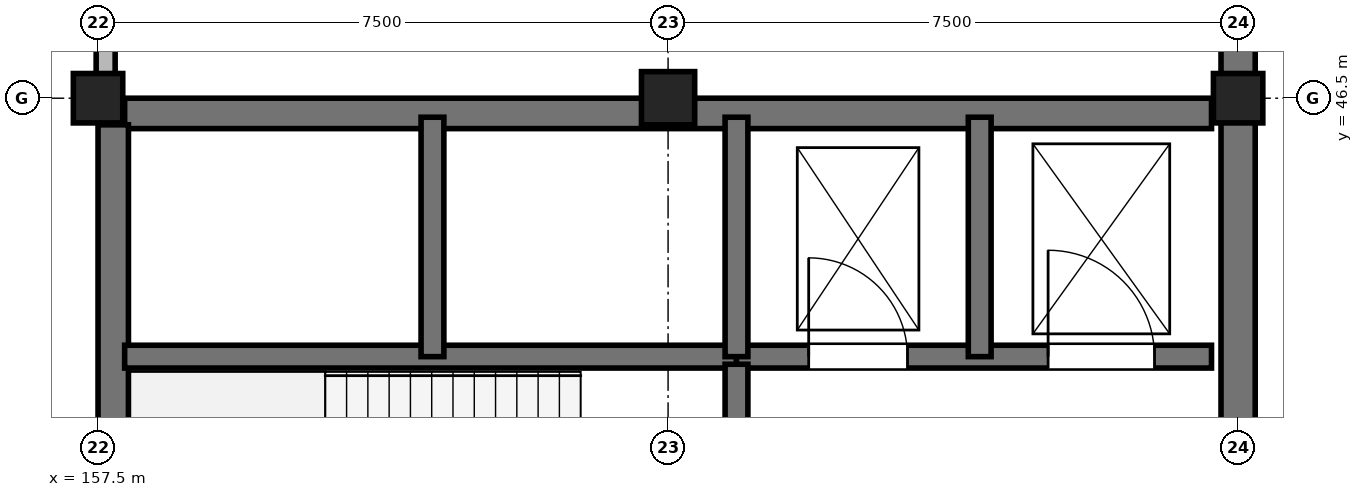
"""IFC4 building model, lengths in metres.
Left out: names, types, materials, properties, quantities, classifications, styles, units other than length and angle.
Written with IfcOpenShell. Run it as: python <this file> out.ifc"""

import sys

from ifc_helpers import new_model, si_unit, direction, frame, frame_2d, origin, origin_2d, place, context, subcontext, project, spatial, rectangle, extrude, element, fill, save


model = new_model("IFC4")
c1 = context("Model", 3, precision=1e-05, world=origin(), true_north=direction((0.0, 1.0)))
c2 = subcontext(c1, "Body", "Model", "MODEL_VIEW")
j1 = project(units=[si_unit("LENGTHUNIT", "METRE"), si_unit("PLANEANGLEUNIT", "RADIAN")], contexts=[c1])
p1 = place(None, origin())
s1 = spatial("IfcSite", under=j1, at=p1, CompositionType="ELEMENT")
p2 = place(p1, origin())
s2 = spatial("IfcBuilding", under=s1, at=p2, CompositionType="ELEMENT")
p3 = place(p2, frame((0.0, 0.0, -4.5)))
s3 = spatial("IfcBuildingStorey", under=s2, at=p3, CompositionType="ELEMENT", Elevation=-4.5)
p4 = place(p3, frame((157.5, 46.5, 0.0), z_axis=(0.0, 0.0, 1.0), x_axis=(1.0, 0.0, 0.0)))
e1 = element("IfcColumn", 1, at=p4, inside=s3, PredefinedType="COLUMN", context=c2, shape_type="SweptSolid", body=[
    extrude(rectangle(XDim=0.65, YDim=0.65, at=origin_2d()), origin(), (0.0, 0.0, 1.0), 4.5),
])
p5 = place(p3, frame((165.0, 46.5, 0.0), z_axis=(0.0, 0.0, 1.0), x_axis=(1.0, 0.0, 0.0)))
e2 = element("IfcColumn", 2, at=p5, inside=s3, PredefinedType="COLUMN", context=c2, shape_type="SweptSolid", body=[
    extrude(rectangle(XDim=0.7, YDim=0.7, at=origin_2d()), origin(), (0.0, 0.0, 1.0), 4.5),
])
p6 = place(p3, frame((172.5, 46.5, 0.0), z_axis=(0.0, 0.0, 1.0), x_axis=(1.0, 0.0, 0.0)))
e3 = element("IfcColumn", 3, at=p6, inside=s3, PredefinedType="COLUMN", context=c2, shape_type="SweptSolid", body=[
    extrude(rectangle(XDim=0.65, YDim=0.65, at=origin_2d()), origin(), (0.0, 0.0, 1.0), 4.5),
])
for number, where, z_axis, x_axis in (
    (4, (172.5, 54.0, 0.0), (0.0, 0.0, 1.0), (0.0, -1.0, 0.0)),
    (5, (172.5, 46.5, 0.0), (0.0, 0.0, 1.0), (0.0, -1.0, 0.0)),
):
    element("IfcWall", number, at=place(p3, frame(where, z_axis=z_axis, x_axis=x_axis)), inside=s3, PredefinedType="SOLIDWALL", context=c2, shape_type="SweptSolid", body=[
        extrude(rectangle(XDim=7.5, YDim=0.45, at=frame_2d((3.75, 0.0))), origin(), (0.0, 0.0, 1.0), 4.14),
    ])
p7 = place(p3, frame((157.85, 46.3, 0.0), z_axis=(0.0, 0.0, 1.0), x_axis=(1.0, 0.0, 0.0)))
e6 = element("IfcWall", 6, at=p7, inside=s3, PredefinedType="SHEAR", context=c2, shape_type="SweptSolid", body=[
    extrude(rectangle(XDim=14.3, YDim=0.4, at=frame_2d((7.15, 0.0))), origin(), (0.0, 0.0, 1.0), 4.14),
])
p8 = place(p3, frame((157.7, 39.35, 0.0), z_axis=(0.0, 0.0, 1.0), x_axis=(0.0, 1.0, 0.0)))
e7 = element("IfcWall", 7, at=p8, inside=s3, PredefinedType="SHEAR", context=c2, shape_type="SweptSolid", body=[
    extrude(rectangle(XDim=6.8, YDim=0.4, at=frame_2d((3.4, 0.0))), origin(), (0.0, 0.0, 1.0), 4.14),
])
p9 = place(p3, frame((157.85, 43.1, 0.0), z_axis=(0.0, 0.0, 1.0), x_axis=(1.0, 0.0, 0.0)))
e8 = element("IfcWall", 8, at=p9, inside=s3, PredefinedType="SHEAR", context=c2, shape_type="SweptSolid", body=[
    extrude(rectangle(XDim=8.05, YDim=0.3, at=frame_2d((4.025, 0.0))), origin(), (0.0, 0.0, 1.0), 4.14),
])
p10 = place(p3, frame((165.9, 43.1, 0.0), z_axis=(0.0, 0.0, 1.0), x_axis=(1.0, 0.0, 0.0)))
e9 = element("IfcWall", 9, at=p10, inside=s3, PredefinedType="SHEAR", context=c2, shape_type="SweptSolid", body=[
    extrude(rectangle(XDim=6.25, YDim=0.3, at=frame_2d((3.125, 0.0))), origin(), (0.0, 0.0, 1.0), 4.14),
])
p11 = place(p10, frame((0.95, 0.0, 0.0)))
e10 = element("IfcOpeningElement", 10, at=p11, cuts=e9, PredefinedType="OPENING", context=c2, shape_type="SweptSolid", body=[
    extrude(rectangle(XDim=1.3, YDim=2.2, at=frame_2d((0.65, 1.1))), frame((0.0, 0.16, 0.0), z_axis=(0.0, -1.0, 0.0), x_axis=(1.0, 0.0, 0.0)), (0.0, 0.0, 1.0), 0.32),
])
p12 = place(p10, frame((4.1, 0.0, 0.0)))
e11 = element("IfcOpeningElement", 11, at=p12, cuts=e9, PredefinedType="OPENING", context=c2, shape_type="SweptSolid", body=[
    extrude(rectangle(XDim=1.4, YDim=2.25, at=frame_2d((0.7, 1.125))), frame((0.0, 0.16, 0.0), z_axis=(0.0, -1.0, 0.0), x_axis=(1.0, 0.0, 0.0)), (0.0, 0.0, 1.0), 0.32),
])
p13 = place(p3, frame((165.9, 43.0, 0.0), z_axis=(0.0, 0.0, 1.0), x_axis=(0.0, -1.0, 0.0)))
e12 = element("IfcWall", 12, at=p13, inside=s3, PredefinedType="SHEAR", context=c2, shape_type="SweptSolid", body=[
    extrude(rectangle(XDim=3.65, YDim=0.3, at=frame_2d((1.825, 0.0))), origin(), (0.0, 0.0, 1.0), 4.14),
])
p14 = place(p13, frame((1.22, 0.0, 0.0)))
e13 = element("IfcOpeningElement", 13, at=p14, cuts=e12, PredefinedType="OPENING", context=c2, shape_type="SweptSolid", body=[
    extrude(rectangle(XDim=1.2, YDim=2.25, at=frame_2d((0.6, 1.125))), frame((0.0, 0.16, 0.0), z_axis=(0.0, -1.0, 0.0), x_axis=(1.0, 0.0, 0.0)), (0.0, 0.0, 1.0), 0.32),
])
for number, where, z_axis, x_axis in (
    (14, (161.9, 43.1, 0.0), (0.0, 0.0, 1.0), (0.0, 1.0, 0.0)),
    (15, (165.9, 43.1, 0.0), (0.0, 0.0, 1.0), (0.0, 1.0, 0.0)),
    (16, (169.1, 43.1, 0.0), (0.0, 0.0, 1.0), (0.0, 1.0, 0.0)),
):
    element("IfcWall", number, at=place(p3, frame(where, z_axis=z_axis, x_axis=x_axis)), inside=s3, PredefinedType="SHEAR", context=c2, shape_type="SweptSolid", body=[
        extrude(rectangle(XDim=3.15, YDim=0.3, at=frame_2d((1.575, 0.0))), origin(), (0.0, 0.0, 1.0), 4.14),
    ])
p15 = place(p3, frame((157.6, 85.0, 0.0), z_axis=(0.0, 0.0, 1.0), x_axis=(0.0, -1.0, 0.0)))
e17 = element("IfcWall", 17, at=p15, inside=s3, PredefinedType="STANDARD", context=c2, shape_type="SweptSolid", body=[
    extrude(rectangle(XDim=38.2, YDim=0.25, at=frame_2d((19.1, 0.0))), origin(), (0.0, 0.0, 1.0), 3.425),
])
p16 = place(p15, frame((3.87, 0.0, 0.0)))
e18 = element("IfcOpeningElement", 18, at=p16, cuts=e17, PredefinedType="OPENING", context=c2, shape_type="SweptSolid", body=[
    extrude(rectangle(XDim=1.5, YDim=2.3, at=frame_2d((0.75, 1.15))), frame((0.0, 0.135, 0.0), z_axis=(0.0, -1.0, 0.0), x_axis=(1.0, 0.0, 0.0)), (0.0, 0.0, 1.0), 0.27),
])
p17 = place(p11, origin())
e19 = element("IfcDoor", 19, at=p17, inside=s3, OperationType="DOUBLE_DOOR_SLIDING", PredefinedType="DOOR", context=c2, shape_type="SweptSolid", body=[
    extrude(rectangle(XDim=1.3, YDim=2.2, at=frame_2d((0.65, 1.1))), frame((0.0, 0.025, 0.0), z_axis=(0.0, -1.0, 0.0), x_axis=(1.0, 0.0, 0.0)), (0.0, 0.0, 1.0), 0.05),
])
fill(e10, e19)
p18 = place(p12, origin())
e20 = element("IfcDoor", 20, at=p18, inside=s3, OperationType="DOUBLE_DOOR_SLIDING", PredefinedType="DOOR", context=c2, shape_type="SweptSolid", body=[
    extrude(rectangle(XDim=1.4, YDim=2.25, at=frame_2d((0.7, 1.125))), frame((0.0, 0.025, 0.0), z_axis=(0.0, -1.0, 0.0), x_axis=(1.0, 0.0, 0.0)), (0.0, 0.0, 1.0), 0.05),
])
fill(e11, e20)
save(model, sys.argv[1])
